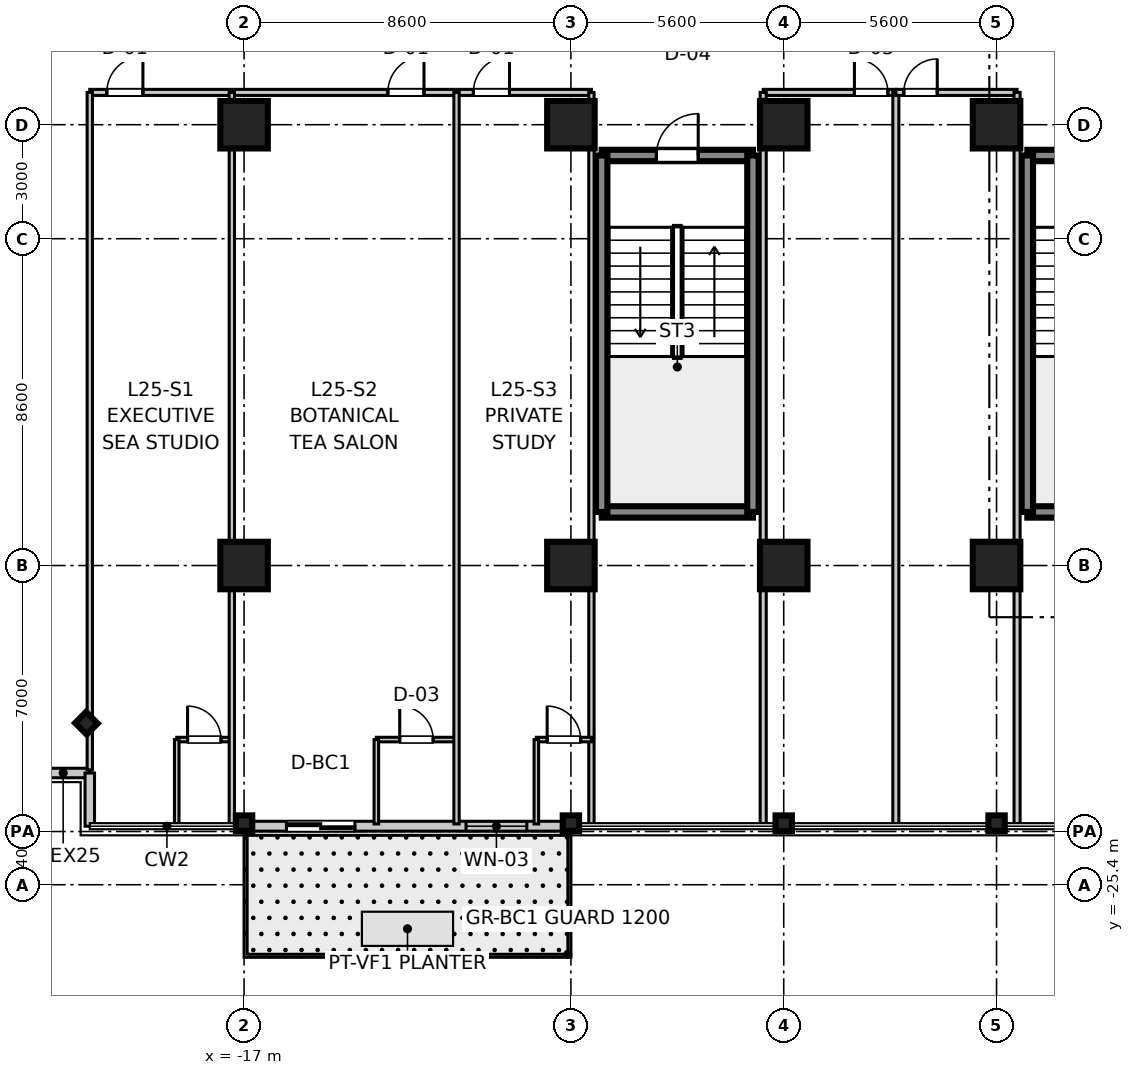
"""IFC4 building model, lengths in metres.
Left out: names, types, materials, properties, quantities, classifications, styles, units other than length and angle.
Written with IfcOpenShell. Run it as: python <this file> out.ifc"""

import sys

from ifc_helpers import new_model, si_unit, direction, frame, frame_2d, origin, origin_2d, place, context, subcontext, project, spatial, rectangle, i_section, extrude, source, transform, mapped, element, fill, save


model = new_model("IFC4")
c1 = context("Model", 3, precision=1e-05, world=origin(), true_north=direction((0.0, 1.0)))
c2 = subcontext(c1, "Body", "Model", "MODEL_VIEW")
j1 = project(units=[si_unit("LENGTHUNIT", "METRE"), si_unit("PLANEANGLEUNIT", "RADIAN")], contexts=[c1])
p1 = place(None, origin())
s1 = spatial("IfcSite", under=j1, at=p1, CompositionType="ELEMENT")
p2 = place(p1, origin())
s2 = spatial("IfcBuilding", under=s1, at=p2, CompositionType="ELEMENT")
p3 = place(p2, frame((0.0, 0.0, 102.9)))
s3 = spatial("IfcBuildingStorey", under=s2, at=p3, CompositionType="ELEMENT", Elevation=102.9)
m1 = source(origin(), c2, "Body", "SweptSolid", [
    extrude(rectangle(XDim=1.25, YDim=1.25, at=origin_2d()), origin(), (0.0, 0.0, 1.0), 3.605),
])
for number, where, z_axis, x_axis in (
    (1, (-17.0, -17.0, 0.0), (0.0, 0.0, 1.0), (1.0, 0.0, 0.0)),
    (2, (-17.0, -5.4, 0.0), (0.0, 0.0, 1.0), (1.0, 0.0, 0.0)),
    (3, (-8.4, -17.0, 0.0), (0.0, 0.0, 1.0), (1.0, 0.0, 0.0)),
    (4, (-8.4, -5.4, 0.0), (0.0, 0.0, 1.0), (1.0, 0.0, 0.0)),
    (5, (-2.8, -17.0, 0.0), (0.0, 0.0, 1.0), (1.0, 0.0, 0.0)),
    (6, (-2.8, -5.4, 0.0), (0.0, 0.0, 1.0), (1.0, 0.0, 0.0)),
    (7, (2.8, -17.0, 0.0), (0.0, 0.0, 1.0), (1.0, 0.0, 0.0)),
    (8, (2.8, -5.4, 0.0), (0.0, 0.0, 1.0), (1.0, 0.0, 0.0)),
):
    element("IfcColumn", number, at=place(p3, frame(where, z_axis=z_axis, x_axis=x_axis)), inside=s3, PredefinedType="COLUMN", context=c2, shape_type="MappedRepresentation", body=[
        mapped(m1, transform((0.0, 0.0, 0.0), scale=1.0)),
    ])
m2 = source(origin(), c2, "Body", "SweptSolid", [
    extrude(i_section(OverallWidth=0.409, OverallDepth=0.43, WebThickness=0.021, FlangeThickness=0.034, at=origin_2d()), origin(), (0.0, 0.0, 1.0), 3.605),
])
for number, where, z_axis, x_axis in (
    (9, (-17.0, -23.78, 0.0), (0.0, 0.0, 1.0), (0.0, 1.0, 0.0)),
    (10, (-8.4, -23.78, 0.0), (0.0, 0.0, 1.0), (0.0, 1.0, 0.0)),
    (11, (-2.8, -23.78, 0.0), (0.0, 0.0, 1.0), (0.0, 1.0, 0.0)),
    (12, (2.8, -23.78, 0.0), (0.0, 0.0, 1.0), (0.0, 1.0, 0.0)),
    (13, (-21.15, -21.15, 0.0), (0.0, 0.0, 1.0), (0.707, 0.707, 0.0)),
):
    element("IfcColumn", number, at=place(p3, frame(where, z_axis=z_axis, x_axis=x_axis)), inside=s3, PredefinedType="COLUMN", context=c2, shape_type="MappedRepresentation", body=[
        mapped(m2, transform((0.0, 0.0, 0.0), scale=1.0)),
    ])
m3 = source(origin(), c2, "Body", "SweptSolid", [
    extrude(rectangle(XDim=3.98, YDim=0.3, at=frame_2d((1.99, 0.0))), origin(), (0.0, 0.0, 1.0), 3.38),
])
for number, where, z_axis, x_axis in (
    (14, (3.61, -15.59, 0.0), (0.0, 0.0, 1.0), (1.0, 0.0, 0.0)),
    (15, (3.61, -6.21, 0.0), (0.0, 0.0, 1.0), (1.0, 0.0, 0.0)),
):
    element("IfcWall", number, at=place(p3, frame(where, z_axis=z_axis, x_axis=x_axis)), inside=s3, PredefinedType="SHEAR", context=c2, shape_type="MappedRepresentation", body=[
        mapped(m3, transform((0.0, 0.0, 0.0), scale=1.0)),
    ])
m4 = source(origin(), c2, "Body", "SweptSolid", [
    extrude(rectangle(XDim=9.38, YDim=0.3, at=frame_2d((4.69, 0.0))), origin(), (0.0, 0.0, 1.0), 3.38),
])
p4 = place(p3, frame((3.61, -15.59, 0.0), z_axis=(0.0, 0.0, 1.0), x_axis=(0.0, 1.0, 0.0)))
e16 = element("IfcWall", 16, at=p4, inside=s3, PredefinedType="SHEAR", context=c2, shape_type="MappedRepresentation", body=[
    mapped(m4, transform((0.0, 0.0, 0.0), scale=1.0)),
])
p5 = place(p3, frame((-7.59, -15.59, 0.0), z_axis=(0.0, 0.0, 1.0), x_axis=(1.0, 0.0, 0.0)))
e17 = element("IfcWall", 17, at=p5, inside=s3, PredefinedType="SHEAR", context=c2, shape_type="MappedRepresentation", body=[
    mapped(m3, transform((0.0, 0.0, 0.0), scale=1.0)),
])
p6 = place(p3, frame((-7.59, -6.21, 0.0), z_axis=(0.0, 0.0, 1.0), x_axis=(1.0, 0.0, 0.0)))
e18 = element("IfcWall", 18, at=p6, inside=s3, PredefinedType="SHEAR", context=c2, shape_type="MappedRepresentation", body=[
    mapped(m3, transform((0.0, 0.0, 0.0), scale=1.0)),
])
p7 = place(p6, frame((1.44, 0.0, 0.0)))
e19 = element("IfcOpeningElement", 19, at=p7, cuts=e18, PredefinedType="OPENING", context=c2, shape_type="SweptSolid", body=[
    extrude(rectangle(XDim=1.1, YDim=2.15, at=frame_2d((0.55, 1.075))), frame((0.0, 0.16, 0.0), z_axis=(0.0, -1.0, 0.0), x_axis=(1.0, 0.0, 0.0)), (0.0, 0.0, 1.0), 0.32),
])
for number, where, z_axis, x_axis in (
    (20, (-7.59, -15.59, 0.0), (0.0, 0.0, 1.0), (0.0, 1.0, 0.0)),
    (21, (-3.61, -15.59, 0.0), (0.0, 0.0, 1.0), (0.0, 1.0, 0.0)),
):
    element("IfcWall", number, at=place(p3, frame(where, z_axis=z_axis, x_axis=x_axis)), inside=s3, PredefinedType="SHEAR", context=c2, shape_type="MappedRepresentation", body=[
        mapped(m4, transform((0.0, 0.0, 0.0), scale=1.0)),
    ])
m5 = source(origin(), c2, "Body", "SweptSolid", [
    extrude(rectangle(XDim=1.4, YDim=0.25, at=frame_2d((0.7, 0.0))), origin(), (0.0, 0.0, 1.0), 3.38),
])
p8 = place(p3, frame((-22.46, -22.46, 0.0), z_axis=(0.0, 0.0, 1.0), x_axis=(1.0, 0.0, 0.0)))
e22 = element("IfcWall", 22, at=p8, inside=s3, PredefinedType="STANDARD", context=c2, shape_type="MappedRepresentation", body=[
    mapped(m5, transform((0.0, 0.0, 0.0), scale=1.0)),
])
m6 = source(origin(), c2, "Body", "SweptSolid", [
    extrude(rectangle(XDim=1.4, YDim=0.25, at=frame_2d((0.7, 0.0))), origin(), (0.0, 0.0, 1.0), 3.38),
])
p9 = place(p3, frame((-21.06, -23.86, 0.0), z_axis=(0.0, 0.0, 1.0), x_axis=(0.0, 1.0, 0.0)))
e23 = element("IfcWall", 23, at=p9, inside=s3, PredefinedType="STANDARD", context=c2, shape_type="MappedRepresentation", body=[
    mapped(m6, transform((0.0, 0.0, 0.0), scale=1.0)),
])
m7 = source(origin(), c2, "Body", "SweptSolid", [
    extrude(rectangle(XDim=8.6, YDim=0.26, at=frame_2d((4.3, 0.0))), origin(), (0.0, 0.0, 1.0), 2.86),
])
p10 = place(p3, frame((-17.0, -23.86, 0.0), z_axis=(0.0, 0.0, 1.0), x_axis=(1.0, 0.0, 0.0)))
e24 = element("IfcWall", 24, at=p10, inside=s3, PredefinedType="STANDARD", context=c2, shape_type="MappedRepresentation", body=[
    mapped(m7, transform((0.0, 0.0, 0.0), scale=1.0)),
])
p11 = place(p10, frame((1.115, 0.0, 0.0)))
e25 = element("IfcOpeningElement", 25, at=p11, cuts=e24, PredefinedType="OPENING", context=c2, shape_type="SweptSolid", body=[
    extrude(rectangle(XDim=1.8, YDim=2.25, at=frame_2d((0.9, 1.125))), frame((0.0, 0.14, 0.0), z_axis=(0.0, -1.0, 0.0), x_axis=(1.0, 0.0, 0.0)), (0.0, 0.0, 1.0), 0.28),
])
p12 = place(p10, frame((5.84, 0.0, 0.85)))
e26 = element("IfcOpeningElement", 26, at=p12, cuts=e24, PredefinedType="OPENING", context=c2, shape_type="SweptSolid", body=[
    extrude(rectangle(XDim=1.6, YDim=1.8, at=frame_2d((0.8, 0.9))), frame((0.0, 0.14, 0.0), z_axis=(0.0, -1.0, 0.0), x_axis=(1.0, 0.0, 0.0)), (0.0, 0.0, 1.0), 0.28),
])
m8 = source(origin(), c2, "Body", "SweptSolid", [
    extrude(rectangle(XDim=13.2, YDim=0.16, at=frame_2d((6.6, 0.0))), origin(), (0.0, 0.0, 1.0), 2.72),
])
p13 = place(p3, frame((-21.06, -4.55, 0.0), z_axis=(0.0, 0.0, 1.0), x_axis=(1.0, 0.0, 0.0)))
e27 = element("IfcWall", 27, at=p13, inside=s3, PredefinedType="PARTITIONING", context=c2, shape_type="MappedRepresentation", body=[
    mapped(m8, transform((0.0, 0.0, 0.0), scale=1.0)),
])
p14 = place(p13, frame((0.448, 0.0, 0.0)))
e28 = element("IfcOpeningElement", 28, at=p14, cuts=e27, PredefinedType="OPENING", context=c2, shape_type="SweptSolid", body=[
    extrude(rectangle(XDim=0.95, YDim=2.1, at=frame_2d((0.475, 1.05))), frame((0.0, 0.09, 0.0), z_axis=(0.0, -1.0, 0.0), x_axis=(1.0, 0.0, 0.0)), (0.0, 0.0, 1.0), 0.18),
])
p15 = place(p13, frame((7.844, 0.0, 0.0)))
e29 = element("IfcOpeningElement", 29, at=p15, cuts=e27, PredefinedType="OPENING", context=c2, shape_type="SweptSolid", body=[
    extrude(rectangle(XDim=0.95, YDim=2.1, at=frame_2d((0.475, 1.05))), frame((0.0, 0.09, 0.0), z_axis=(0.0, -1.0, 0.0), x_axis=(1.0, 0.0, 0.0)), (0.0, 0.0, 1.0), 0.18),
])
p16 = place(p13, frame((10.094, 0.0, 0.0)))
e30 = element("IfcOpeningElement", 30, at=p16, cuts=e27, PredefinedType="OPENING", context=c2, shape_type="SweptSolid", body=[
    extrude(rectangle(XDim=0.95, YDim=2.1, at=frame_2d((0.475, 1.05))), frame((0.0, 0.09, 0.0), z_axis=(0.0, -1.0, 0.0), x_axis=(1.0, 0.0, 0.0)), (0.0, 0.0, 1.0), 0.18),
])
m9 = source(origin(), c2, "Body", "SweptSolid", [
    extrude(rectangle(XDim=17.83, YDim=0.14, at=frame_2d((8.915, 0.0))), origin(), (0.0, 0.0, 1.0), 2.72),
])
p17 = place(p3, frame((-21.06, -22.38, 0.0), z_axis=(0.0, 0.0, 1.0), x_axis=(0.0, 1.0, 0.0)))
e31 = element("IfcWall", 31, at=p17, inside=s3, PredefinedType="PARTITIONING", context=c2, shape_type="MappedRepresentation", body=[
    mapped(m9, transform((0.0, 0.0, 0.0), scale=1.0)),
])
m10 = source(origin(), c2, "Body", "SweptSolid", [
    extrude(rectangle(XDim=19.25, YDim=0.14, at=frame_2d((9.625, 0.0))), origin(), (0.0, 0.0, 1.0), 2.72),
])
p18 = place(p3, frame((-7.86, -23.8, 0.0), z_axis=(0.0, 0.0, 1.0), x_axis=(0.0, 1.0, 0.0)))
e32 = element("IfcWall", 32, at=p18, inside=s3, PredefinedType="PARTITIONING", context=c2, shape_type="MappedRepresentation", body=[
    mapped(m10, transform((0.0, 0.0, 0.0), scale=1.0)),
])
m11 = source(origin(), c2, "Body", "SweptSolid", [
    extrude(rectangle(XDim=1.45, YDim=0.12, at=frame_2d((0.725, 0.0))), origin(), (0.0, 0.0, 1.0), 2.72),
])
p19 = place(p3, frame((-18.772, -21.58, 0.0), z_axis=(0.0, 0.0, 1.0), x_axis=(1.0, 0.0, 0.0)))
e33 = element("IfcWall", 33, at=p19, inside=s3, PredefinedType="PARTITIONING", context=c2, shape_type="MappedRepresentation", body=[
    mapped(m11, transform((0.0, 0.0, 0.0), scale=1.0)),
])
p20 = place(p19, frame((0.285, 0.0, 0.0)))
e34 = element("IfcOpeningElement", 34, at=p20, cuts=e33, PredefinedType="OPENING", context=c2, shape_type="SweptSolid", body=[
    extrude(rectangle(XDim=0.88, YDim=2.1, at=frame_2d((0.44, 1.05))), frame((0.0, 0.07, 0.0), z_axis=(0.0, -1.0, 0.0), x_axis=(1.0, 0.0, 0.0)), (0.0, 0.0, 1.0), 0.14),
])
m12 = source(origin(), c2, "Body", "SweptSolid", [
    extrude(rectangle(XDim=2.22, YDim=0.12, at=frame_2d((1.11, 0.0))), origin(), (0.0, 0.0, 1.0), 2.72),
])
p21 = place(p3, frame((-18.772, -23.8, 0.0), z_axis=(0.0, 0.0, 1.0), x_axis=(0.0, 1.0, 0.0)))
e35 = element("IfcWall", 35, at=p21, inside=s3, PredefinedType="PARTITIONING", context=c2, shape_type="MappedRepresentation", body=[
    mapped(m12, transform((0.0, 0.0, 0.0), scale=1.0)),
])
p22 = place(p3, frame((-17.322, -23.8, 0.0), z_axis=(0.0, 0.0, 1.0), x_axis=(0.0, 1.0, 0.0)))
e36 = element("IfcWall", 36, at=p22, inside=s3, PredefinedType="PARTITIONING", context=c2, shape_type="MappedRepresentation", body=[
    mapped(m10, transform((0.0, 0.0, 0.0), scale=1.0)),
])
m13 = source(origin(), c2, "Body", "SweptSolid", [
    extrude(rectangle(XDim=2.11, YDim=0.12, at=frame_2d((1.055, 0.0))), origin(), (0.0, 0.0, 1.0), 2.72),
])
p23 = place(p3, frame((-13.52, -21.58, 0.0), z_axis=(0.0, 0.0, 1.0), x_axis=(1.0, 0.0, 0.0)))
e37 = element("IfcWall", 37, at=p23, inside=s3, PredefinedType="PARTITIONING", context=c2, shape_type="MappedRepresentation", body=[
    mapped(m13, transform((0.0, 0.0, 0.0), scale=1.0)),
])
p24 = place(p23, frame((0.615, 0.0, 0.0)))
e38 = element("IfcOpeningElement", 38, at=p24, cuts=e37, PredefinedType="OPENING", context=c2, shape_type="SweptSolid", body=[
    extrude(rectangle(XDim=0.88, YDim=2.1, at=frame_2d((0.44, 1.05))), frame((0.0, 0.07, 0.0), z_axis=(0.0, -1.0, 0.0), x_axis=(1.0, 0.0, 0.0)), (0.0, 0.0, 1.0), 0.14),
])
p25 = place(p3, frame((-13.52, -23.8, 0.0), z_axis=(0.0, 0.0, 1.0), x_axis=(0.0, 1.0, 0.0)))
e39 = element("IfcWall", 39, at=p25, inside=s3, PredefinedType="PARTITIONING", context=c2, shape_type="MappedRepresentation", body=[
    mapped(m12, transform((0.0, 0.0, 0.0), scale=1.0)),
])
p26 = place(p3, frame((-11.41, -23.8, 0.0), z_axis=(0.0, 0.0, 1.0), x_axis=(0.0, 1.0, 0.0)))
e40 = element("IfcWall", 40, at=p26, inside=s3, PredefinedType="PARTITIONING", context=c2, shape_type="MappedRepresentation", body=[
    mapped(m10, transform((0.0, 0.0, 0.0), scale=1.0)),
])
p27 = place(p3, frame((-9.31, -21.58, 0.0), z_axis=(0.0, 0.0, 1.0), x_axis=(1.0, 0.0, 0.0)))
e41 = element("IfcWall", 41, at=p27, inside=s3, PredefinedType="PARTITIONING", context=c2, shape_type="MappedRepresentation", body=[
    mapped(m11, transform((0.0, 0.0, 0.0), scale=1.0)),
])
p28 = place(p27, frame((0.285, 0.0, 0.0)))
e42 = element("IfcOpeningElement", 42, at=p28, cuts=e41, PredefinedType="OPENING", context=c2, shape_type="SweptSolid", body=[
    extrude(rectangle(XDim=0.88, YDim=2.1, at=frame_2d((0.44, 1.05))), frame((0.0, 0.07, 0.0), z_axis=(0.0, -1.0, 0.0), x_axis=(1.0, 0.0, 0.0)), (0.0, 0.0, 1.0), 0.14),
])
p29 = place(p3, frame((-9.31, -23.8, 0.0), z_axis=(0.0, 0.0, 1.0), x_axis=(0.0, 1.0, 0.0)))
e43 = element("IfcWall", 43, at=p29, inside=s3, PredefinedType="PARTITIONING", context=c2, shape_type="MappedRepresentation", body=[
    mapped(m12, transform((0.0, 0.0, 0.0), scale=1.0)),
])
m14 = source(origin(), c2, "Body", "SweptSolid", [
    extrude(rectangle(XDim=3.49, YDim=0.16, at=frame_2d((1.745, 0.0))), origin(), (0.0, 0.0, 1.0), 2.72),
])
p30 = place(p3, frame((-3.34, -4.55, 0.0), z_axis=(0.0, 0.0, 1.0), x_axis=(1.0, 0.0, 0.0)))
e44 = element("IfcWall", 44, at=p30, inside=s3, PredefinedType="PARTITIONING", context=c2, shape_type="MappedRepresentation", body=[
    mapped(m14, transform((0.0, 0.0, 0.0), scale=1.0)),
])
p31 = place(p30, frame((2.4, 0.0, 0.0)))
e45 = element("IfcOpeningElement", 45, at=p31, cuts=e44, PredefinedType="OPENING", context=c2, shape_type="SweptSolid", body=[
    extrude(rectangle(XDim=0.88, YDim=2.1, at=frame_2d((0.44, 1.05))), frame((0.0, 0.09, 0.0), z_axis=(0.0, -1.0, 0.0), x_axis=(1.0, 0.0, 0.0)), (0.0, 0.0, 1.0), 0.18),
])
m15 = source(origin(), c2, "Body", "SweptSolid", [
    extrude(rectangle(XDim=19.25, YDim=0.16, at=frame_2d((9.625, 0.0))), origin(), (0.0, 0.0, 1.0), 2.72),
])
for number, where, z_axis, x_axis in (
    (46, (-3.34, -23.8, 0.0), (0.0, 0.0, 1.0), (0.0, 1.0, 0.0)),
    (47, (0.15, -23.8, 0.0), (0.0, 0.0, 1.0), (0.0, 1.0, 0.0)),
):
    element("IfcWall", number, at=place(p3, frame(where, z_axis=z_axis, x_axis=x_axis)), inside=s3, PredefinedType="PARTITIONING", context=c2, shape_type="MappedRepresentation", body=[
        mapped(m15, transform((0.0, 0.0, 0.0), scale=1.0)),
    ])
m16 = source(origin(), c2, "Body", "SweptSolid", [
    extrude(rectangle(XDim=3.19, YDim=0.16, at=frame_2d((1.595, 0.0))), origin(), (0.0, 0.0, 1.0), 2.72),
])
p32 = place(p3, frame((0.15, -4.55, 0.0), z_axis=(0.0, 0.0, 1.0), x_axis=(1.0, 0.0, 0.0)))
e48 = element("IfcWall", 48, at=p32, inside=s3, PredefinedType="PARTITIONING", context=c2, shape_type="MappedRepresentation", body=[
    mapped(m16, transform((0.0, 0.0, 0.0), scale=1.0)),
])
p33 = place(p32, frame((0.21, 0.0, 0.0)))
e49 = element("IfcOpeningElement", 49, at=p33, cuts=e48, PredefinedType="OPENING", context=c2, shape_type="SweptSolid", body=[
    extrude(rectangle(XDim=0.88, YDim=2.1, at=frame_2d((0.44, 1.05))), frame((0.0, 0.09, 0.0), z_axis=(0.0, -1.0, 0.0), x_axis=(1.0, 0.0, 0.0)), (0.0, 0.0, 1.0), 0.18),
])
p34 = place(p3, frame((3.34, -23.8, 0.0), z_axis=(0.0, 0.0, 1.0), x_axis=(0.0, 1.0, 0.0)))
e50 = element("IfcWall", 50, at=p34, inside=s3, PredefinedType="PARTITIONING", context=c2, shape_type="MappedRepresentation", body=[
    mapped(m15, transform((0.0, 0.0, 0.0), scale=1.0)),
])
m17 = source(origin(), c2, "Body", "SweptSolid", [
    extrude(rectangle(XDim=1.1, YDim=2.15, at=frame_2d((0.55, 1.075))), frame((0.0, 0.025, 0.0), z_axis=(0.0, -1.0, 0.0), x_axis=(1.0, 0.0, 0.0)), (0.0, 0.0, 1.0), 0.05),
])
p35 = place(p7, frame((1.1, 0.0, 0.0), z_axis=(0.0, 0.0, 1.0), x_axis=(-1.0, 0.0, 0.0)))
e51 = element("IfcDoor", 51, at=p35, inside=s3, OperationType="SINGLE_SWING_RIGHT", PredefinedType="DOOR", context=c2, shape_type="MappedRepresentation", body=[
    mapped(m17, transform((0.0, 0.0, 0.0), scale=1.0)),
])
fill(e19, e51)
m18 = source(origin(), c2, "Body", "SweptSolid", [
    extrude(rectangle(XDim=0.88, YDim=2.1, at=frame_2d((0.44, 1.05))), frame((0.0, 0.025, 0.0), z_axis=(0.0, -1.0, 0.0), x_axis=(1.0, 0.0, 0.0)), (0.0, 0.0, 1.0), 0.05),
])
p36 = place(p20, frame((0.88, 0.0, 0.0), z_axis=(0.0, 0.0, 1.0), x_axis=(-1.0, 0.0, 0.0)))
e52 = element("IfcDoor", 52, at=p36, inside=s3, OperationType="SINGLE_SWING_LEFT", PredefinedType="DOOR", context=c2, shape_type="MappedRepresentation", body=[
    mapped(m18, transform((0.0, 0.0, 0.0), scale=1.0)),
])
fill(e34, e52)
m19 = source(origin(), c2, "Body", "SweptSolid", [
    extrude(rectangle(XDim=0.95, YDim=2.1, at=frame_2d((0.475, 1.05))), frame((0.0, 0.025, 0.0), z_axis=(0.0, -1.0, 0.0), x_axis=(1.0, 0.0, 0.0)), (0.0, 0.0, 1.0), 0.05),
])
p37 = place(p14, frame((0.95, 0.0, 0.0), z_axis=(0.0, 0.0, 1.0), x_axis=(-1.0, 0.0, 0.0)))
e53 = element("IfcDoor", 53, at=p37, inside=s3, OperationType="SINGLE_SWING_RIGHT", PredefinedType="DOOR", context=c2, shape_type="MappedRepresentation", body=[
    mapped(m19, transform((0.0, 0.0, 0.0), scale=1.0)),
])
fill(e28, e53)
p38 = place(p24, frame((0.88, 0.0, 0.0), z_axis=(0.0, 0.0, 1.0), x_axis=(-1.0, 0.0, 0.0)))
e54 = element("IfcDoor", 54, at=p38, inside=s3, OperationType="SINGLE_SWING_LEFT", PredefinedType="DOOR", context=c2, shape_type="MappedRepresentation", body=[
    mapped(m18, transform((0.0, 0.0, 0.0), scale=1.0)),
])
fill(e38, e54)
p39 = place(p15, frame((0.95, 0.0, 0.0), z_axis=(0.0, 0.0, 1.0), x_axis=(-1.0, 0.0, 0.0)))
e55 = element("IfcDoor", 55, at=p39, inside=s3, OperationType="SINGLE_SWING_RIGHT", PredefinedType="DOOR", context=c2, shape_type="MappedRepresentation", body=[
    mapped(m19, transform((0.0, 0.0, 0.0), scale=1.0)),
])
fill(e29, e55)
p40 = place(p28, frame((0.88, 0.0, 0.0), z_axis=(0.0, 0.0, 1.0), x_axis=(-1.0, 0.0, 0.0)))
e56 = element("IfcDoor", 56, at=p40, inside=s3, OperationType="SINGLE_SWING_LEFT", PredefinedType="DOOR", context=c2, shape_type="MappedRepresentation", body=[
    mapped(m18, transform((0.0, 0.0, 0.0), scale=1.0)),
])
fill(e42, e56)
p41 = place(p16, frame((0.95, 0.0, 0.0), z_axis=(0.0, 0.0, 1.0), x_axis=(-1.0, 0.0, 0.0)))
e57 = element("IfcDoor", 57, at=p41, inside=s3, OperationType="SINGLE_SWING_RIGHT", PredefinedType="DOOR", context=c2, shape_type="MappedRepresentation", body=[
    mapped(m19, transform((0.0, 0.0, 0.0), scale=1.0)),
])
fill(e30, e57)
p42 = place(p31, frame((0.88, 0.0, 0.0), z_axis=(0.0, 0.0, 1.0), x_axis=(-1.0, 0.0, 0.0)))
e58 = element("IfcDoor", 58, at=p42, inside=s3, OperationType="SINGLE_SWING_LEFT", PredefinedType="DOOR", context=c2, shape_type="MappedRepresentation", body=[
    mapped(m18, transform((0.0, 0.0, 0.0), scale=1.0)),
])
fill(e45, e58)
p43 = place(p33, frame((0.88, 0.0, 0.0), z_axis=(0.0, 0.0, 1.0), x_axis=(-1.0, 0.0, 0.0)))
e59 = element("IfcDoor", 59, at=p43, inside=s3, OperationType="SINGLE_SWING_RIGHT", PredefinedType="DOOR", context=c2, shape_type="MappedRepresentation", body=[
    mapped(m18, transform((0.0, 0.0, 0.0), scale=1.0)),
])
fill(e49, e59)
m20 = source(origin(), c2, "Body", "SweptSolid", [
    extrude(rectangle(XDim=1.8, YDim=2.25, at=frame_2d((0.9, 1.125))), frame((0.0, 0.025, 0.0), z_axis=(0.0, -1.0, 0.0), x_axis=(1.0, 0.0, 0.0)), (0.0, 0.0, 1.0), 0.05),
])
p44 = place(p11, frame((1.8, 0.0, 0.0), z_axis=(0.0, 0.0, 1.0), x_axis=(-1.0, 0.0, 0.0)))
e60 = element("IfcDoor", 60, at=p44, inside=s3, OperationType="DOUBLE_DOOR_SLIDING", PredefinedType="DOOR", context=c2, shape_type="MappedRepresentation", body=[
    mapped(m20, transform((0.0, 0.0, 0.0), scale=1.0)),
])
fill(e25, e60)
m21 = source(origin(), c2, "Body", "SweptSolid", [
    extrude(rectangle(XDim=1.6, YDim=1.8, at=frame_2d((0.8, 0.9))), frame((0.0, 0.03, 0.0), z_axis=(0.0, -1.0, 0.0), x_axis=(1.0, 0.0, 0.0)), (0.0, 0.0, 1.0), 0.06),
])
p45 = place(p12, origin())
e61 = element("IfcWindow", 61, at=p45, inside=s3, PartitioningType="SINGLE_PANEL", PredefinedType="WINDOW", context=c2, shape_type="MappedRepresentation", body=[
    mapped(m21, transform((0.0, 0.0, 0.0), scale=1.0)),
])
fill(e26, e61)
save(model, sys.argv[1])
